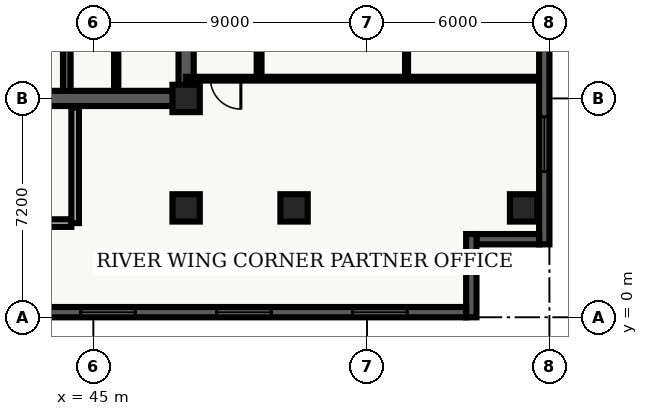
"""IFC4 building model, lengths in metres.
Left out: names, types, materials, properties, quantities, classifications, styles, units other than length and angle.
Written with IfcOpenShell. Run it as: python <this file> out.ifc"""

import sys

from ifc_helpers import new_model, entity, si_unit, converted_unit, direction, frame, origin_with_axes, origin_2d_with_axis, place, context, subcontext, project, spatial, polyline, rectangle, outline, extrude, element, fill, save


model = new_model("IFC4")
c1 = context("Model", 3, precision=1e-05, world=origin_with_axes(), true_north=direction((0.0, 1.0)))
c2 = subcontext(c1, "Body", "Model", "MODEL_VIEW")
j1 = project(units=[si_unit("LENGTHUNIT", "METRE"), converted_unit("PLANEANGLEUNIT", "DEGREE", entity("IfcPlaneAngleMeasure", 0.017), si_unit("PLANEANGLEUNIT", "RADIAN"), dimensions=[0, 0, 0, 0, 0, 0, 0])], contexts=[c1])
p1 = place(None, origin_with_axes())
s1 = spatial("IfcSite", under=j1, at=p1, CompositionType="ELEMENT")
p2 = place(p1, origin_with_axes())
s2 = spatial("IfcBuilding", under=s1, at=p2, CompositionType="ELEMENT")
p3 = place(p2, frame((0.0, 0.0, 192.6), z_axis=(0.0, 0.0, 1.0), x_axis=(1.0, 0.0, 0.0)))
s3 = spatial("IfcBuildingStorey", under=s2, at=p3, CompositionType="ELEMENT", Elevation=192.6)
p4 = place(p3, frame((40.2, 7.2, 0.0), z_axis=(0.0, 0.0, 1.0), x_axis=(1.0, 0.0, 0.0)))
e1 = element("IfcWall", 1, at=p4, inside=s3, PredefinedType="SHEAR", context=c2, shape_type="SweptSolid", body=[
    extrude(outline(polyline([(0.0, -0.25), (7.85, -0.25), (7.85, 0.25), (0.0, 0.25), (0.0, -0.25)])), origin_with_axes(), (0.0, 0.0, 1.0), 3.66),
])
p5 = place(p4, frame((2.175, 0.0, 0.0), z_axis=(0.0, 0.0, 1.0), x_axis=(1.0, 0.0, 0.0)))
e2 = element("IfcOpeningElement", 2, at=p5, cuts=e1, PredefinedType="OPENING", context=c2, shape_type="SweptSolid", body=[
    extrude(rectangle(XDim=1.05, YDim=0.52, at=origin_2d_with_axis()), origin_with_axes(), (0.0, 0.0, 1.0), 2.15),
])
p6 = place(p3, frame((48.05, 7.2, 0.0), z_axis=(0.0, 0.0, 1.0), x_axis=(0.0, 1.0, 0.0)))
e3 = element("IfcWall", 3, at=p6, inside=s3, PredefinedType="SHEAR", context=c2, shape_type="SweptSolid", body=[
    extrude(outline(polyline([(0.0, -0.25), (15.6, -0.25), (15.6, 0.25), (0.0, 0.25), (0.0, -0.25)])), origin_with_axes(), (0.0, 0.0, 1.0), 3.66),
])
p7 = place(p6, frame((5.975, 0.0, 0.0), z_axis=(0.0, 0.0, 1.0), x_axis=(1.0, 0.0, 0.0)))
e4 = element("IfcOpeningElement", 4, at=p7, cuts=e3, PredefinedType="OPENING", context=c2, shape_type="SweptSolid", body=[
    extrude(rectangle(XDim=1.05, YDim=0.52, at=origin_2d_with_axis()), origin_with_axes(), (0.0, 0.0, 1.0), 2.15),
])
p8 = place(p6, frame((2.725, 0.0, 0.0), z_axis=(0.0, 0.0, 1.0), x_axis=(1.0, 0.0, 0.0)))
e5 = element("IfcOpeningElement", 5, at=p8, cuts=e3, PredefinedType="OPENING", context=c2, shape_type="SweptSolid", body=[
    extrude(rectangle(XDim=0.95, YDim=0.52, at=origin_2d_with_axis()), origin_with_axes(), (0.0, 0.0, 1.0), 2.15),
])
p9 = place(p3, frame((44.125, 7.45, 0.0), z_axis=(0.0, 0.0, 1.0), x_axis=(0.0, 1.0, 0.0)))
e6 = element("IfcWall", 6, at=p9, inside=s3, PredefinedType="SHEAR", context=c2, shape_type="SweptSolid", body=[
    extrude(outline(polyline([(0.0, -0.125), (15.1, -0.125), (15.1, 0.125), (0.0, 0.125), (0.0, -0.125)])), origin_with_axes(), (0.0, 0.0, 1.0), 3.66),
])
p10 = place(p3, frame((40.325, 3.1, 0.0), z_axis=(0.0, 0.0, 1.0), x_axis=(1.0, 0.0, 0.0)))
e7 = element("IfcWall", 7, at=p10, inside=s3, PredefinedType="SOLIDWALL", context=c2, shape_type="SweptSolid", body=[
    extrude(outline(polyline([(0.0, -0.125), (3.95, -0.125), (3.95, 0.125), (0.0, 0.125), (0.0, -0.125)])), origin_with_axes(), (0.0, 0.0, 1.0), 2.7),
])
p11 = place(p3, frame((44.4, 3.1, 0.0), z_axis=(0.0, 0.0, 1.0), x_axis=(0.0, 1.0, 0.0)))
e8 = element("IfcWall", 8, at=p11, inside=s3, PredefinedType="SOLIDWALL", context=c2, shape_type="SweptSolid", body=[
    extrude(outline(polyline([(0.0, -0.125), (3.8, -0.125), (3.8, 0.125), (0.0, 0.125), (0.0, -0.125)])), origin_with_axes(), (0.0, 0.0, 1.0), 2.7),
])
for number, where, z_axis, x_axis in (
    (9, (48.05, 3.6, 0.0), (0.0, 0.0, 1.0), (1.0, 0.0, 0.0)),
    (10, (48.05, 7.2, 0.0), (0.0, 0.0, 1.0), (1.0, 0.0, 0.0)),
    (11, (51.6, 3.6, 0.0), (0.0, 0.0, 1.0), (1.0, 0.0, 0.0)),
    (12, (59.15, 3.6, 0.0), (0.0, 0.0, 1.0), (1.0, 0.0, 0.0)),
):
    element("IfcColumn", number, at=place(p3, frame(where, z_axis=z_axis, x_axis=x_axis)), inside=s3, PredefinedType="COLUMN", context=c2, shape_type="SweptSolid", body=[
        extrude(rectangle(XDim=0.9, YDim=0.9, at=origin_2d_with_axis()), origin_with_axes(), (0.0, 0.0, 1.0), 3.9),
    ])
p12 = place(p3, frame((45.75, 7.5, 0.0), z_axis=(0.0, 0.0, 1.0), x_axis=(0.0, 1.0, 0.0)))
e13 = element("IfcWall", 13, at=p12, inside=s3, PredefinedType="PARTITIONING", context=c2, shape_type="SweptSolid", body=[
    extrude(outline(polyline([(0.0, -0.07), (4.08, -0.07), (4.08, 0.07), (0.0, 0.07), (0.0, -0.07)])), origin_with_axes(), (0.0, 0.0, 1.0), 2.7),
])
p13 = place(p12, frame((2.0, 0.0, 0.0), z_axis=(0.0, 0.0, 1.0), x_axis=(1.0, 0.0, 0.0)))
e14 = element("IfcOpeningElement", 14, at=p13, cuts=e13, PredefinedType="OPENING", context=c2, shape_type="SweptSolid", body=[
    extrude(rectangle(XDim=0.9, YDim=0.16, at=origin_2d_with_axis()), origin_with_axes(), (0.0, 0.0, 1.0), 2.15),
])
p14 = place(p3, frame((50.45, 7.85, 0.0), z_axis=(0.0, 0.0, 1.0), x_axis=(0.0, 1.0, 0.0)))
e15 = element("IfcWall", 15, at=p14, inside=s3, PredefinedType="PARTITIONING", context=c2, shape_type="SweptSolid", body=[
    extrude(outline(polyline([(0.0, -0.08), (18.8, -0.08), (18.8, 0.08), (0.0, 0.08), (0.0, -0.08)])), origin_with_axes(), (0.0, 0.0, 1.0), 2.7),
])
p15 = place(p14, frame((5.84, 0.0, 0.0), z_axis=(0.0, 0.0, 1.0), x_axis=(1.0, 0.0, 0.0)))
e16 = element("IfcOpeningElement", 16, at=p15, cuts=e15, PredefinedType="OPENING", context=c2, shape_type="SweptSolid", body=[
    extrude(rectangle(XDim=1.0, YDim=0.18, at=origin_2d_with_axis()), origin_with_axes(), (0.0, 0.0, 1.0), 2.15),
])
p16 = place(p14, frame((11.293, 0.0, 0.0), z_axis=(0.0, 0.0, 1.0), x_axis=(1.0, 0.0, 0.0)))
e17 = element("IfcOpeningElement", 17, at=p16, cuts=e15, PredefinedType="OPENING", context=c2, shape_type="SweptSolid", body=[
    extrude(rectangle(XDim=1.0, YDim=0.18, at=origin_2d_with_axis()), origin_with_axes(), (0.0, 0.0, 1.0), 2.15),
])
p17 = place(p14, frame((14.169, 0.0, 0.0), z_axis=(0.0, 0.0, 1.0), x_axis=(1.0, 0.0, 0.0)))
e18 = element("IfcOpeningElement", 18, at=p17, cuts=e15, PredefinedType="OPENING", context=c2, shape_type="SweptSolid", body=[
    extrude(rectangle(XDim=1.0, YDim=0.18, at=origin_2d_with_axis()), origin_with_axes(), (0.0, 0.0, 1.0), 2.15),
])
p18 = place(p3, frame((59.665, 7.85, 0.0), z_axis=(0.0, 0.0, 1.0), x_axis=(-1.0, 0.0, 0.0)))
e19 = element("IfcWall", 19, at=p18, inside=s3, PredefinedType="PARTITIONING", context=c2, shape_type="SweptSolid", body=[
    extrude(outline(polyline([(0.0, -0.062), (11.615, -0.062), (11.615, 0.062), (0.0, 0.062), (0.0, -0.062)])), origin_with_axes(), (0.0, 0.0, 1.0), 2.7),
])
p19 = place(p18, frame((10.315, 0.0, 0.0), z_axis=(0.0, 0.0, 1.0), x_axis=(1.0, 0.0, 0.0)))
e20 = element("IfcOpeningElement", 20, at=p19, cuts=e19, PredefinedType="OPENING", context=c2, shape_type="SweptSolid", body=[
    extrude(rectangle(XDim=1.0, YDim=0.145, at=origin_2d_with_axis()), origin_with_axes(), (0.0, 0.0, 1.0), 2.15),
])
p20 = place(p3, frame((55.3, 7.98, 0.0), z_axis=(0.0, 0.0, 1.0), x_axis=(0.0, 1.0, 0.0)))
e21 = element("IfcWall", 21, at=p20, inside=s3, PredefinedType="PARTITIONING", context=c2, shape_type="SweptSolid", body=[
    extrude(outline(polyline([(0.0, -0.05), (18.54, -0.05), (18.54, 0.05), (0.0, 0.05), (0.0, -0.05)])), origin_with_axes(), (0.0, 0.0, 1.0), 2.7),
])
p21 = place(p20, frame((1.776, 0.0, 0.0), z_axis=(0.0, 0.0, 1.0), x_axis=(1.0, 0.0, 0.0)))
e22 = element("IfcOpeningElement", 22, at=p21, cuts=e21, PredefinedType="OPENING", context=c2, shape_type="SweptSolid", body=[
    extrude(rectangle(XDim=0.95, YDim=0.12, at=origin_2d_with_axis()), origin_with_axes(), (0.0, 0.0, 1.0), 2.15),
])
p22 = place(p20, frame((5.71, 0.0, 0.0), z_axis=(0.0, 0.0, 1.0), x_axis=(1.0, 0.0, 0.0)))
e23 = element("IfcOpeningElement", 23, at=p22, cuts=e21, PredefinedType="OPENING", context=c2, shape_type="SweptSolid", body=[
    extrude(rectangle(XDim=0.95, YDim=0.12, at=origin_2d_with_axis()), origin_with_axes(), (0.0, 0.0, 1.0), 2.15),
])
p23 = place(p20, frame((10.283, 0.0, 0.0), z_axis=(0.0, 0.0, 1.0), x_axis=(1.0, 0.0, 0.0)))
e24 = element("IfcOpeningElement", 24, at=p23, cuts=e21, PredefinedType="OPENING", context=c2, shape_type="SweptSolid", body=[
    extrude(rectangle(XDim=0.95, YDim=0.12, at=origin_2d_with_axis()), origin_with_axes(), (0.0, 0.0, 1.0), 2.15),
])
p24 = place(p20, frame((15.689, 0.0, 0.0), z_axis=(0.0, 0.0, 1.0), x_axis=(1.0, 0.0, 0.0)))
e25 = element("IfcOpeningElement", 25, at=p24, cuts=e21, PredefinedType="OPENING", context=c2, shape_type="SweptSolid", body=[
    extrude(rectangle(XDim=0.95, YDim=0.12, at=origin_2d_with_axis()), origin_with_axes(), (0.0, 0.0, 1.0), 2.15),
])
p25 = place(p3, frame((59.83, 26.06, 0.0), z_axis=(0.0, 0.0, 1.0), x_axis=(0.0, -1.0, 0.0)))
e26 = element("IfcWall", 26, at=p25, inside=s3, PredefinedType="SOLIDWALL", context=c2, shape_type="SweptSolid", body=[
    extrude(outline(polyline([(0.0, -0.17), (23.66, -0.17), (23.66, 0.17), (0.0, 0.17), (0.0, -0.17)])), origin_with_axes(), (0.0, 0.0, 1.0), 3.66),
])
p26 = place(p25, frame((3.696, 0.0, 0.45), z_axis=(0.0, 0.0, 1.0), x_axis=(1.0, 0.0, 0.0)))
e27 = element("IfcOpeningElement", 27, at=p26, cuts=e26, PredefinedType="OPENING", context=c2, shape_type="SweptSolid", body=[
    extrude(rectangle(XDim=1.8, YDim=0.36, at=origin_2d_with_axis()), origin_with_axes(), (0.0, 0.0, 1.0), 2.1),
])
p27 = place(p25, frame((11.83, 0.0, 0.45), z_axis=(0.0, 0.0, 1.0), x_axis=(1.0, 0.0, 0.0)))
e28 = element("IfcOpeningElement", 28, at=p27, cuts=e26, PredefinedType="OPENING", context=c2, shape_type="SweptSolid", body=[
    extrude(rectangle(XDim=1.8, YDim=0.36, at=origin_2d_with_axis()), origin_with_axes(), (0.0, 0.0, 1.0), 2.1),
])
p28 = place(p25, frame((20.364, 0.0, 0.45), z_axis=(0.0, 0.0, 1.0), x_axis=(1.0, 0.0, 0.0)))
e29 = element("IfcOpeningElement", 29, at=p28, cuts=e26, PredefinedType="OPENING", context=c2, shape_type="SweptSolid", body=[
    extrude(rectangle(XDim=1.8, YDim=0.36, at=origin_2d_with_axis()), origin_with_axes(), (0.0, 0.0, 1.0), 2.1),
])
p29 = place(p3, frame((59.66, 2.57, 0.0), z_axis=(0.0, 0.0, 1.0), x_axis=(-1.0, 0.0, 0.0)))
e30 = element("IfcWall", 30, at=p29, inside=s3, PredefinedType="SOLIDWALL", context=c2, shape_type="SweptSolid", body=[
    extrude(outline(polyline([(0.0, -0.17), (2.06, -0.17), (2.06, 0.17), (0.0, 0.17), (0.0, -0.17)])), origin_with_axes(), (0.0, 0.0, 1.0), 3.66),
])
p30 = place(p3, frame((57.43, 2.74, 0.0), z_axis=(0.0, 0.0, 1.0), x_axis=(0.0, -1.0, 0.0)))
e31 = element("IfcWall", 31, at=p30, inside=s3, PredefinedType="SOLIDWALL", context=c2, shape_type="SweptSolid", body=[
    extrude(outline(polyline([(0.0, -0.17), (2.74, -0.17), (2.74, 0.17), (0.0, 0.17), (0.0, -0.17)])), origin_with_axes(), (0.0, 0.0, 1.0), 3.66),
])
p31 = place(p3, frame((57.26, 0.17, 0.0), z_axis=(0.0, 0.0, 1.0), x_axis=(-1.0, 0.0, 0.0)))
e32 = element("IfcWall", 32, at=p31, inside=s3, PredefinedType="SOLIDWALL", context=c2, shape_type="SweptSolid", body=[
    extrude(outline(polyline([(0.0, -0.17), (54.86, -0.17), (54.86, 0.17), (0.0, 0.17), (0.0, -0.17)])), origin_with_axes(), (0.0, 0.0, 1.0), 3.66),
])
p32 = place(p31, frame((2.836, 0.0, 0.45), z_axis=(0.0, 0.0, 1.0), x_axis=(1.0, 0.0, 0.0)))
e33 = element("IfcOpeningElement", 33, at=p32, cuts=e32, PredefinedType="OPENING", context=c2, shape_type="SweptSolid", body=[
    extrude(rectangle(XDim=1.8, YDim=0.36, at=origin_2d_with_axis()), origin_with_axes(), (0.0, 0.0, 1.0), 2.1),
])
p33 = place(p31, frame((7.307, 0.0, 0.45), z_axis=(0.0, 0.0, 1.0), x_axis=(1.0, 0.0, 0.0)))
e34 = element("IfcOpeningElement", 34, at=p33, cuts=e32, PredefinedType="OPENING", context=c2, shape_type="SweptSolid", body=[
    extrude(rectangle(XDim=1.8, YDim=0.36, at=origin_2d_with_axis()), origin_with_axes(), (0.0, 0.0, 1.0), 2.1),
])
p34 = place(p31, frame((11.779, 0.0, 0.45), z_axis=(0.0, 0.0, 1.0), x_axis=(1.0, 0.0, 0.0)))
e35 = element("IfcOpeningElement", 35, at=p34, cuts=e32, PredefinedType="OPENING", context=c2, shape_type="SweptSolid", body=[
    extrude(rectangle(XDim=1.8, YDim=0.36, at=origin_2d_with_axis()), origin_with_axes(), (0.0, 0.0, 1.0), 2.1),
])
p35 = place(p31, frame((16.251, 0.0, 0.45), z_axis=(0.0, 0.0, 1.0), x_axis=(1.0, 0.0, 0.0)))
e36 = element("IfcOpeningElement", 36, at=p35, cuts=e32, PredefinedType="OPENING", context=c2, shape_type="SweptSolid", body=[
    extrude(rectangle(XDim=1.8, YDim=0.36, at=origin_2d_with_axis()), origin_with_axes(), (0.0, 0.0, 1.0), 2.1),
])
p36 = place(p31, frame((20.723, 0.0, 0.45), z_axis=(0.0, 0.0, 1.0), x_axis=(1.0, 0.0, 0.0)))
e37 = element("IfcOpeningElement", 37, at=p36, cuts=e32, PredefinedType="OPENING", context=c2, shape_type="SweptSolid", body=[
    extrude(rectangle(XDim=1.8, YDim=0.36, at=origin_2d_with_axis()), origin_with_axes(), (0.0, 0.0, 1.0), 2.1),
])
p37 = place(p31, frame((34.588, 0.0, 0.45), z_axis=(0.0, 0.0, 1.0), x_axis=(1.0, 0.0, 0.0)))
e38 = element("IfcOpeningElement", 38, at=p37, cuts=e32, PredefinedType="OPENING", context=c2, shape_type="SweptSolid", body=[
    extrude(rectangle(XDim=1.8, YDim=0.36, at=origin_2d_with_axis()), origin_with_axes(), (0.0, 0.0, 1.0), 2.1),
])
p38 = place(p31, frame((38.609, 0.0, 0.45), z_axis=(0.0, 0.0, 1.0), x_axis=(1.0, 0.0, 0.0)))
e39 = element("IfcOpeningElement", 39, at=p38, cuts=e32, PredefinedType="OPENING", context=c2, shape_type="SweptSolid", body=[
    extrude(rectangle(XDim=1.8, YDim=0.36, at=origin_2d_with_axis()), origin_with_axes(), (0.0, 0.0, 1.0), 2.1),
])
p39 = place(p31, frame((43.081, 0.0, 0.45), z_axis=(0.0, 0.0, 1.0), x_axis=(1.0, 0.0, 0.0)))
e40 = element("IfcOpeningElement", 40, at=p39, cuts=e32, PredefinedType="OPENING", context=c2, shape_type="SweptSolid", body=[
    extrude(rectangle(XDim=1.8, YDim=0.36, at=origin_2d_with_axis()), origin_with_axes(), (0.0, 0.0, 1.0), 2.1),
])
p40 = place(p31, frame((48.003, 0.0, 0.45), z_axis=(0.0, 0.0, 1.0), x_axis=(1.0, 0.0, 0.0)))
e41 = element("IfcOpeningElement", 41, at=p40, cuts=e32, PredefinedType="OPENING", context=c2, shape_type="SweptSolid", body=[
    extrude(rectangle(XDim=1.8, YDim=0.36, at=origin_2d_with_axis()), origin_with_axes(), (0.0, 0.0, 1.0), 2.1),
])
p41 = place(p31, frame((52.024, 0.0, 0.45), z_axis=(0.0, 0.0, 1.0), x_axis=(1.0, 0.0, 0.0)))
e42 = element("IfcOpeningElement", 42, at=p41, cuts=e32, PredefinedType="OPENING", context=c2, shape_type="SweptSolid", body=[
    extrude(rectangle(XDim=1.8, YDim=0.36, at=origin_2d_with_axis()), origin_with_axes(), (0.0, 0.0, 1.0), 2.1),
])
p42 = place(p18, frame((10.315, 0.0, 0.0), z_axis=(0.0, 0.0, 1.0), x_axis=(1.0, 0.0, 0.0)))
e43 = element("IfcDoor", 43, at=p42, inside=s3, OperationType="SINGLE_SWING_LEFT", PredefinedType="DOOR", context=c2, shape_type="SweptSolid", body=[
    extrude(rectangle(XDim=1.0, YDim=0.075, at=origin_2d_with_axis()), origin_with_axes(), (0.0, 0.0, 1.0), 2.15),
])
fill(e20, e43)
p43 = place(p25, frame((20.364, 0.0, 0.45), z_axis=(0.0, 0.0, 1.0), x_axis=(1.0, 0.0, 0.0)))
e44 = element("IfcWindow", 44, at=p43, inside=s3, PredefinedType="WINDOW", context=c2, shape_type="SweptSolid", body=[
    extrude(rectangle(XDim=1.8, YDim=0.09, at=origin_2d_with_axis()), origin_with_axes(), (0.0, 0.0, 1.0), 2.1),
])
fill(e29, e44)
p44 = place(p31, frame((2.836, 0.0, 0.45), z_axis=(0.0, 0.0, 1.0), x_axis=(1.0, 0.0, 0.0)))
e45 = element("IfcWindow", 45, at=p44, inside=s3, PredefinedType="WINDOW", context=c2, shape_type="SweptSolid", body=[
    extrude(rectangle(XDim=1.8, YDim=0.09, at=origin_2d_with_axis()), origin_with_axes(), (0.0, 0.0, 1.0), 2.1),
])
fill(e33, e45)
p45 = place(p31, frame((7.307, 0.0, 0.45), z_axis=(0.0, 0.0, 1.0), x_axis=(1.0, 0.0, 0.0)))
e46 = element("IfcWindow", 46, at=p45, inside=s3, PredefinedType="WINDOW", context=c2, shape_type="SweptSolid", body=[
    extrude(rectangle(XDim=1.8, YDim=0.09, at=origin_2d_with_axis()), origin_with_axes(), (0.0, 0.0, 1.0), 2.1),
])
fill(e34, e46)
p46 = place(p31, frame((11.779, 0.0, 0.45), z_axis=(0.0, 0.0, 1.0), x_axis=(1.0, 0.0, 0.0)))
e47 = element("IfcWindow", 47, at=p46, inside=s3, PredefinedType="WINDOW", context=c2, shape_type="SweptSolid", body=[
    extrude(rectangle(XDim=1.8, YDim=0.09, at=origin_2d_with_axis()), origin_with_axes(), (0.0, 0.0, 1.0), 2.1),
])
fill(e35, e47)
save(model, sys.argv[1])
